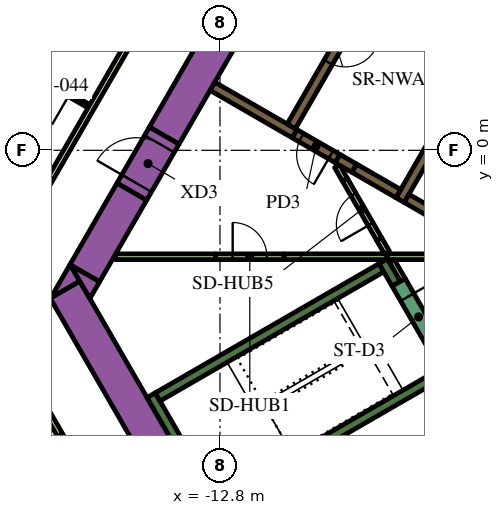
"""IFC4 building model, lengths in metres.
Left out: names, types, materials, properties, quantities, classifications, styles, units other than length and angle.
Written with IfcOpenShell. Run it as: python <this file> out.ifc"""

import sys

from ifc_helpers import new_model, si_unit, direction, frame, frame_2d, origin, place, context, subcontext, project, spatial, polyline, rectangle, outline, extrude, element, fill, save


model = new_model("IFC4")
c1 = context("Model", 3, precision=1e-05, world=origin(), true_north=direction((0.0, 1.0)))
c2 = subcontext(c1, "Body", "Model", "MODEL_VIEW")
j1 = project(units=[si_unit("LENGTHUNIT", "METRE"), si_unit("PLANEANGLEUNIT", "RADIAN")], contexts=[c1])
p1 = place(None, origin())
s1 = spatial("IfcSite", under=j1, at=p1, CompositionType="ELEMENT")
p2 = place(p1, origin())
s2 = spatial("IfcBuilding", under=s1, at=p2, CompositionType="ELEMENT")
p3 = place(p2, frame((0.0, 0.0, 58.8)))
s3 = spatial("IfcBuildingStorey", under=s2, at=p3, CompositionType="ELEMENT", Elevation=58.8)
p4 = place(p3, frame((-14.268, 0.387, 0.0), z_axis=(0.0, 0.0, 1.0), x_axis=(0.499994617707, 0.866028511231, 0.0)))
e1 = element("IfcWall", 1, at=p4, inside=s3, PredefinedType="SOLIDWALL", context=c2, shape_type="SweptSolid", body=[
    extrude(rectangle(XDim=18.817, YDim=0.9, at=frame_2d((9.409, 0.0))), origin(), (0.0, 0.0, 1.0), 3.9),
])
p5 = place(p3, frame((-12.134, -11.883, 0.0), z_axis=(0.0, 0.0, 1.0), x_axis=(-0.500005339912, 0.866022320763, 0.0)))
e2 = element("IfcWall", 2, at=p5, inside=s3, PredefinedType="SOLIDWALL", context=c2, shape_type="SweptSolid", body=[
    extrude(rectangle(XDim=9.488, YDim=0.9, at=frame_2d((4.744, 0.0))), origin(), (0.0, 0.0, 1.0), 3.9),
])
p6 = place(p3, origin())
e3 = element("IfcWall", 3, at=p6, inside=s3, PredefinedType="SOLIDWALL", context=c2, shape_type="SweptSolid", body=[
    extrude(outline(polyline([(-16.489, -3.44), (-17.251, -3.88), (-16.743, -3.0), (-16.489, -3.44)])), origin(), (0.0, 0.0, 1.0), 3.9),
])
p7 = place(p3, frame((-15.118, -1.085, 0.0), z_axis=(0.0, 0.0, 1.0), x_axis=(-0.50006606081, -0.865987260198, 0.0)))
e4 = element("IfcWall", 4, at=p7, inside=s3, PredefinedType="SOLIDWALL", context=c2, shape_type="SweptSolid", body=[
    extrude(rectangle(XDim=2.481, YDim=0.9, at=frame_2d((1.24, 0.0))), origin(), (0.0, 0.0, 1.0), 3.9),
])
e5 = element("IfcWall", 5, at=p6, inside=s3, PredefinedType="SOLIDWALL", context=c2, shape_type="SweptSolid", body=[
    extrude(outline(polyline([(-16.223, -3.9), (-16.732, -3.02), (-15.969, -3.46), (-16.223, -3.9)])), origin(), (0.0, 0.0, 1.0), 3.9),
])
p8 = place(p3, frame((-12.885, -9.431, 0.0), z_axis=(0.0, 0.0, 1.0), x_axis=(-0.500020560727, 0.866013532718, 0.0)))
e6 = element("IfcWall", 6, at=p8, inside=s3, PredefinedType="SOLIDWALL", context=c2, shape_type="SweptSolid", body=[
    extrude(rectangle(XDim=3.45, YDim=0.25, at=frame_2d((1.725, 0.0))), origin(), (0.0, 0.0, 1.0), 3.9),
])
p9 = place(p3, frame((-14.44, -6.49, 0.0), z_axis=(0.0, 0.0, 1.0), x_axis=(0.866022966069, 0.500004222222, 0.0)))
e7 = element("IfcWall", 7, at=p9, inside=s3, PredefinedType="SOLIDWALL", context=c2, shape_type="SweptSolid", body=[
    extrude(rectangle(XDim=6.8, YDim=0.25, at=frame_2d((3.4, 0.0))), origin(), (0.0, 0.0, 1.0), 3.9),
])
p10 = place(p3, frame((-8.163, -3.511, 0.0), z_axis=(0.0, 0.0, 1.0), x_axis=(-0.500206266495, 0.865906283012, 0.0)))
e8 = element("IfcWall", 8, at=p10, inside=s3, PredefinedType="SOLIDWALL", context=c2, shape_type="SweptSolid", body=[
    extrude(rectangle(XDim=0.684, YDim=0.25, at=frame_2d((0.342, 0.0))), origin(), (0.0, 0.0, 1.0), 3.9),
])
p11 = place(p3, frame((-12.84, -9.261, 0.0), z_axis=(0.0, 0.0, 1.0), x_axis=(0.866016039709, 0.500016218704, 0.0)))
e9 = element("IfcWall", 9, at=p11, inside=s3, PredefinedType="SOLIDWALL", context=c2, shape_type="SweptSolid", body=[
    extrude(rectangle(XDim=7.05, YDim=0.25, at=frame_2d((3.525, 0.0))), origin(), (0.0, 0.0, 1.0), 3.9),
])
p12 = place(p3, frame((-8.06, -1.311, 0.0), z_axis=(0.0, 0.0, 1.0), x_axis=(0.50000273126, 0.866023826885, 0.0)))
e10 = element("IfcWall", 10, at=p12, inside=s3, PredefinedType="SOLIDWALL", context=c2, shape_type="SweptSolid", body=[
    extrude(rectangle(XDim=10.33, YDim=0.25, at=frame_2d((5.165, 0.0))), origin(), (0.0, 0.0, 1.0), 3.9),
])
e11 = element("IfcWall", 11, at=p6, inside=s3, PredefinedType="SOLIDWALL", context=c2, shape_type="SweptSolid", body=[
    extrude(outline(polyline([(-5.922, -2.257), (-5.922, -2.257), (-5.705, -2.382), (-5.83, -2.598), (-6.418, -2.258), (-6.433, -2.153), (-6.433, -2.153), (-6.433, -2.153), (-6.508, -2.163), (-6.508, -2.163), (-6.508, -2.163), (-6.501, -2.21), (-7.952, -1.373), (-7.827, -1.156), (-5.922, -2.257)])), origin(), (0.0, 0.0, 1.0), 3.9),
])
p13 = place(p3, frame((-9.708, -0.215, 0.0), z_axis=(0.0, 0.0, 1.0), x_axis=(0.866113839764, -0.499846793097, 0.0)))
e12 = element("IfcWall", 12, at=p13, inside=s3, PredefinedType="SOLIDWALL", context=c2, shape_type="SweptSolid", body=[
    extrude(rectangle(XDim=0.51, YDim=0.25, at=frame_2d((0.255, 0.0))), origin(), (0.0, 0.0, 1.0), 3.9),
])
p14 = place(p3, frame((-12.999, 1.685, 0.0), z_axis=(0.0, 0.0, 1.0), x_axis=(0.865996765544, -0.500049599607, 0.0)))
e13 = element("IfcWall", 13, at=p14, inside=s3, PredefinedType="SOLIDWALL", context=c2, shape_type="SweptSolid", body=[
    extrude(rectangle(XDim=2.498, YDim=0.25, at=frame_2d((1.249, 0.0))), origin(), (0.0, 0.0, 1.0), 3.9),
])
p15 = place(p3, frame((-9.265, -0.471, 0.0), z_axis=(0.0, 0.0, 1.0), x_axis=(0.865954634268, -0.500122556369, 0.0)))
e14 = element("IfcWall", 14, at=p15, inside=s3, PredefinedType="SOLIDWALL", context=c2, shape_type="SweptSolid", body=[
    extrude(rectangle(XDim=1.338, YDim=0.25, at=frame_2d((0.669, 0.0))), origin(), (0.0, 0.0, 1.0), 3.9),
])
p16 = place(p3, frame((-12.915, -2.8, 0.0), z_axis=(0.0, 0.0, 1.0), x_axis=(-1.0, 0.0, 0.0)))
e15 = element("IfcWall", 15, at=p16, inside=s3, PredefinedType="PARTITIONING", context=c2, shape_type="SweptSolid", body=[
    extrude(rectangle(XDim=2.637, YDim=0.15, at=frame_2d((1.318, 0.0))), origin(), (0.0, 0.0, 1.0), 2.75),
])
p17 = place(p3, frame((-8.395, -2.8, 0.0), z_axis=(0.0, 0.0, 1.0), x_axis=(1.0, 0.0, 0.0)))
e16 = element("IfcWall", 16, at=p17, inside=s3, PredefinedType="PARTITIONING", context=c2, shape_type="SweptSolid", body=[
    extrude(rectangle(XDim=1.828, YDim=0.15, at=frame_2d((0.914, 0.0))), origin(), (0.0, 0.0, 1.0), 2.75),
])
p18 = place(p3, frame((-11.115, -2.8, 0.0), z_axis=(0.0, 0.0, 1.0), x_axis=(1.0, 0.0, 0.0)))
e17 = element("IfcWall", 17, at=p18, inside=s3, PredefinedType="PARTITIONING", context=c2, shape_type="SweptSolid", body=[
    extrude(rectangle(XDim=2.708, YDim=0.15, at=frame_2d((1.354, 0.0))), origin(), (0.0, 0.0, 1.0), 2.75),
])
p19 = place(p3, frame((-7.99, -3.412, 0.0), z_axis=(0.0, 0.0, 1.0), x_axis=(-0.500193841991, 0.86591346013, 0.0)))
e18 = element("IfcWall", 18, at=p19, inside=s3, PredefinedType="PARTITIONING", context=c2, shape_type="SweptSolid", body=[
    extrude(rectangle(XDim=0.583, YDim=0.15, at=frame_2d((0.292, 0.0))), origin(), (0.0, 0.0, 1.0), 2.75),
])
p20 = place(p3, frame((-8.612, -2.333, 0.0), z_axis=(0.0, 0.0, 1.0), x_axis=(0.500248216681, -0.86588204838, 0.0)))
e19 = element("IfcWall", 19, at=p20, inside=s3, PredefinedType="PARTITIONING", context=c2, shape_type="SweptSolid", body=[
    extrude(rectangle(XDim=0.415, YDim=0.15, at=frame_2d((0.208, 0.0))), origin(), (0.0, 0.0, 1.0), 2.75),
])
p21 = place(p3, frame((-9.512, -0.775, 0.0), z_axis=(0.0, 0.0, 1.0), x_axis=(-0.500080620599, 0.865978852456, 0.0)))
e20 = element("IfcWall", 20, at=p21, inside=s3, PredefinedType="PARTITIONING", context=c2, shape_type="SweptSolid", body=[
    extrude(rectangle(XDim=0.413, YDim=0.15, at=frame_2d((0.207, 0.0))), origin(), (0.0, 0.0, 1.0), 2.75),
])
p22 = place(p3, frame((-6.008, 9.144, 0.0), z_axis=(0.0, 0.0, 1.0), x_axis=(-0.500006956611, -0.866021387346, 0.0)))
e21 = element("IfcWall", 21, at=p22, inside=s3, PredefinedType="SOLIDWALL", context=c2, shape_type="SweptSolid", body=[
    extrude(rectangle(XDim=9.83, YDim=0.25, at=frame_2d((4.915, 0.0))), origin(), (0.0, 0.0, 1.0), 3.9),
])
p23 = place(p22, frame((6.985, 0.0, 0.0)))
e22 = element("IfcOpeningElement", 22, at=p23, cuts=e21, PredefinedType="OPENING", context=c2, shape_type="SweptSolid", body=[
    extrude(rectangle(XDim=0.9, YDim=2.1, at=frame_2d((0.45, 1.05))), frame((0.0, 0.135, 0.0), z_axis=(0.0, -1.0, 0.0), x_axis=(1.0, 0.0, 0.0)), (0.0, 0.0, 1.0), 0.27),
])
p24 = place(p3, frame((-8.098, -3.474, 0.0), z_axis=(0.0, 0.0, 1.0), x_axis=(0.49994051562, -0.866059744384, 0.0)))
e23 = element("IfcWall", 23, at=p24, inside=s3, PredefinedType="SOLIDWALL", context=c2, shape_type="SweptSolid", body=[
    extrude(rectangle(XDim=2.1, YDim=0.4, at=frame_2d((1.05, 0.0))), origin(), (0.0, 0.0, 1.0), 3.9),
])
p25 = place(p24, frame((0.45, 0.0, 0.0)))
e24 = element("IfcOpeningElement", 24, at=p25, cuts=e23, PredefinedType="OPENING", context=c2, shape_type="SweptSolid", body=[
    extrude(rectangle(XDim=1.2, YDim=2.1, at=frame_2d((0.6, 1.05))), frame((0.0, 0.21, 0.0), z_axis=(0.0, -1.0, 0.0), x_axis=(1.0, 0.0, 0.0)), (0.0, 0.0, 1.0), 0.42),
])
p26 = place(p3, frame((-9.708, -0.215, 0.0), z_axis=(0.0, 0.0, 1.0), x_axis=(-0.866004217611, 0.500036693733, 0.0)))
e25 = element("IfcWall", 25, at=p26, inside=s3, PredefinedType="SOLIDWALL", context=c2, shape_type="SweptSolid", body=[
    extrude(rectangle(XDim=1.3, YDim=0.25, at=frame_2d((0.65, 0.0))), origin(), (0.0, 0.0, 1.0), 3.9),
])
p27 = place(p26, frame((0.2, 0.0, 0.0)))
e26 = element("IfcOpeningElement", 26, at=p27, cuts=e25, PredefinedType="OPENING", context=c2, shape_type="SweptSolid", body=[
    extrude(rectangle(XDim=0.9, YDim=2.1, at=frame_2d((0.45, 1.05))), frame((0.0, 0.135, 0.0), z_axis=(0.0, -1.0, 0.0), x_axis=(1.0, 0.0, 0.0)), (0.0, 0.0, 1.0), 0.27),
])
p28 = place(p3, frame((-15.118, -1.085, 0.0), z_axis=(0.0, 0.0, 1.0), x_axis=(0.500000056704, 0.866025371046, 0.0)))
e27 = element("IfcWall", 27, at=p28, inside=s3, PredefinedType="SOLIDWALL", context=c2, shape_type="SweptSolid", body=[
    extrude(rectangle(XDim=1.7, YDim=0.9, at=frame_2d((0.85, 0.0))), origin(), (0.0, 0.0, 1.0), 3.9),
])
p29 = place(p28, frame((0.25, 0.0, 0.0)))
e28 = element("IfcOpeningElement", 28, at=p29, cuts=e27, PredefinedType="OPENING", context=c2, shape_type="SweptSolid", body=[
    extrude(rectangle(XDim=1.2, YDim=2.1, at=frame_2d((0.6, 1.05))), frame((0.0, 0.46, 0.0), z_axis=(0.0, -1.0, 0.0), x_axis=(1.0, 0.0, 0.0)), (0.0, 0.0, 1.0), 0.92),
])
p30 = place(p3, frame((-12.915, -2.8, 0.0), z_axis=(0.0, 0.0, 1.0), x_axis=(1.0, 0.0, 0.0)))
e29 = element("IfcWall", 29, at=p30, inside=s3, PredefinedType="PARTITIONING", context=c2, shape_type="SweptSolid", body=[
    extrude(rectangle(XDim=1.8, YDim=0.15, at=frame_2d((0.9, 0.0))), origin(), (0.0, 0.0, 1.0), 2.75),
])
p31 = place(p30, frame((0.45, 0.0, 0.0)))
e30 = element("IfcOpeningElement", 30, at=p31, cuts=e29, PredefinedType="OPENING", context=c2, shape_type="SweptSolid", body=[
    extrude(rectangle(XDim=0.9, YDim=2.1, at=frame_2d((0.45, 1.05))), frame((0.0, 0.085, 0.0), z_axis=(0.0, -1.0, 0.0), x_axis=(1.0, 0.0, 0.0)), (0.0, 0.0, 1.0), 0.17),
])
p32 = place(p3, frame((-8.612, -2.333, 0.0), z_axis=(0.0, 0.0, 1.0), x_axis=(-0.499961193289, 0.866047807691, 0.0)))
e31 = element("IfcWall", 31, at=p32, inside=s3, PredefinedType="PARTITIONING", context=c2, shape_type="SweptSolid", body=[
    extrude(rectangle(XDim=1.8, YDim=0.15, at=frame_2d((0.9, 0.0))), origin(), (0.0, 0.0, 1.0), 2.75),
])
p33 = place(p32, frame((0.45, 0.0, 0.0)))
e32 = element("IfcOpeningElement", 32, at=p33, cuts=e31, PredefinedType="OPENING", context=c2, shape_type="SweptSolid", body=[
    extrude(rectangle(XDim=0.9, YDim=2.1, at=frame_2d((0.45, 1.05))), frame((0.0, 0.085, 0.0), z_axis=(0.0, -1.0, 0.0), x_axis=(1.0, 0.0, 0.0)), (0.0, 0.0, 1.0), 0.17),
])
p34 = place(p3, frame((-19.081, -3.9, 0.0), z_axis=(0.0, 0.0, 1.0), x_axis=(0.499998313975, 0.866026377209, 0.0)))
e33 = element("IfcWall", 33, at=p34, inside=s3, PredefinedType="PARTITIONING", context=c2, shape_type="SweptSolid", body=[
    extrude(rectangle(XDim=25.766, YDim=0.15, at=frame_2d((12.883, 0.0))), origin(), (0.0, 0.0, 1.0), 2.75),
])
p35 = place(p34, frame((22.445, 0.0, 0.0)))
e34 = element("IfcOpeningElement", 34, at=p35, cuts=e33, PredefinedType="OPENING", context=c2, shape_type="SweptSolid", body=[
    extrude(rectangle(XDim=1.0, YDim=2.1, at=frame_2d((0.5, 1.05))), frame((0.0, 0.085, 0.0), z_axis=(0.0, -1.0, 0.0), x_axis=(1.0, 0.0, 0.0)), (0.0, 0.0, 1.0), 0.17),
])
p36 = place(p34, frame((21.138, 0.0, 0.0)))
e35 = element("IfcOpeningElement", 35, at=p36, cuts=e33, PredefinedType="OPENING", context=c2, shape_type="SweptSolid", body=[
    extrude(rectangle(XDim=1.0, YDim=2.1, at=frame_2d((0.5, 1.05))), frame((0.0, 0.085, 0.0), z_axis=(0.0, -1.0, 0.0), x_axis=(1.0, 0.0, 0.0)), (0.0, 0.0, 1.0), 0.17),
])
p37 = place(p34, frame((14.066, 0.0, 0.0)))
e36 = element("IfcOpeningElement", 36, at=p37, cuts=e33, PredefinedType="OPENING", context=c2, shape_type="SweptSolid", body=[
    extrude(rectangle(XDim=0.9, YDim=2.1, at=frame_2d((0.45, 1.05))), frame((0.0, 0.085, 0.0), z_axis=(0.0, -1.0, 0.0), x_axis=(1.0, 0.0, 0.0)), (0.0, 0.0, 1.0), 0.17),
])
p38 = place(p34, frame((11.693, 0.0, 0.0)))
e37 = element("IfcOpeningElement", 37, at=p38, cuts=e33, PredefinedType="OPENING", context=c2, shape_type="SweptSolid", body=[
    extrude(rectangle(XDim=1.0, YDim=2.1, at=frame_2d((0.5, 1.05))), frame((0.0, 0.085, 0.0), z_axis=(0.0, -1.0, 0.0), x_axis=(1.0, 0.0, 0.0)), (0.0, 0.0, 1.0), 0.17),
])
p39 = place(p3, frame((-16.412, -8.523, 0.0), z_axis=(0.0, 0.0, 1.0), x_axis=(-0.500001929737, 0.866024289647, 0.0)))
e38 = element("IfcWall", 38, at=p39, inside=s3, PredefinedType="PARTITIONING", context=c2, shape_type="SweptSolid", body=[
    extrude(rectangle(XDim=5.268, YDim=0.15, at=frame_2d((2.634, 0.0))), origin(), (0.0, 0.0, 1.0), 2.75),
])
p40 = place(p39, frame((0.226, 0.0, 0.0)))
e39 = element("IfcOpeningElement", 39, at=p40, cuts=e38, PredefinedType="OPENING", context=c2, shape_type="SweptSolid", body=[
    extrude(rectangle(XDim=1.0, YDim=2.1, at=frame_2d((0.5, 1.05))), frame((0.0, 0.085, 0.0), z_axis=(0.0, -1.0, 0.0), x_axis=(1.0, 0.0, 0.0)), (0.0, 0.0, 1.0), 0.17),
])
p41 = place(p3, frame((-16.247, 1.159, 0.0), z_axis=(0.0, 0.0, 1.0), x_axis=(-0.866059108428, 0.4999416173, 0.0)))
e40 = element("IfcWall", 40, at=p41, inside=s3, PredefinedType="PARTITIONING", context=c2, shape_type="SweptSolid", body=[
    extrude(rectangle(XDim=2.7, YDim=0.1, at=frame_2d((1.35, 0.0))), origin(), (0.0, 0.0, 1.0), 2.75),
])
p42 = place(p41, frame((0.6, 0.0, 0.0)))
e41 = element("IfcOpeningElement", 41, at=p42, cuts=e40, PredefinedType="OPENING", context=c2, shape_type="SweptSolid", body=[
    extrude(rectangle(XDim=0.9, YDim=2.1, at=frame_2d((0.45, 1.05))), frame((0.0, 0.06, 0.0), z_axis=(0.0, -1.0, 0.0), x_axis=(1.0, 0.0, 0.0)), (0.0, 0.0, 1.0), 0.12),
])
p43 = place(p23, origin())
e42 = element("IfcDoor", 42, at=p43, inside=s3, OperationType="SINGLE_SWING_LEFT", PredefinedType="DOOR", context=c2, shape_type="SweptSolid", body=[
    extrude(rectangle(XDim=0.9, YDim=2.1, at=frame_2d((0.45, 1.05))), frame((0.0, 0.025, 0.0), z_axis=(0.0, -1.0, 0.0), x_axis=(1.0, 0.0, 0.0)), (0.0, 0.0, 1.0), 0.05),
])
fill(e22, e42)
p44 = place(p25, origin())
e43 = element("IfcDoor", 43, at=p44, inside=s3, OperationType="SINGLE_SWING_LEFT", PredefinedType="DOOR", context=c2, shape_type="SweptSolid", body=[
    extrude(rectangle(XDim=1.2, YDim=2.1, at=frame_2d((0.6, 1.05))), frame((0.0, 0.025, 0.0), z_axis=(0.0, -1.0, 0.0), x_axis=(1.0, 0.0, 0.0)), (0.0, 0.0, 1.0), 0.05),
])
fill(e24, e43)
p45 = place(p27, origin())
e44 = element("IfcDoor", 44, at=p45, inside=s3, OperationType="SINGLE_SWING_LEFT", PredefinedType="DOOR", context=c2, shape_type="SweptSolid", body=[
    extrude(rectangle(XDim=0.9, YDim=2.1, at=frame_2d((0.45, 1.05))), frame((0.0, 0.025, 0.0), z_axis=(0.0, -1.0, 0.0), x_axis=(1.0, 0.0, 0.0)), (0.0, 0.0, 1.0), 0.05),
])
fill(e26, e44)
p46 = place(p29, origin())
e45 = element("IfcDoor", 45, at=p46, inside=s3, OperationType="SINGLE_SWING_LEFT", PredefinedType="DOOR", context=c2, shape_type="SweptSolid", body=[
    extrude(rectangle(XDim=1.2, YDim=2.1, at=frame_2d((0.6, 1.05))), frame((0.0, 0.025, 0.0), z_axis=(0.0, -1.0, 0.0), x_axis=(1.0, 0.0, 0.0)), (0.0, 0.0, 1.0), 0.05),
])
fill(e28, e45)
p47 = place(p31, origin())
e46 = element("IfcDoor", 46, at=p47, inside=s3, OperationType="SINGLE_SWING_LEFT", PredefinedType="DOOR", context=c2, shape_type="SweptSolid", body=[
    extrude(rectangle(XDim=0.9, YDim=2.1, at=frame_2d((0.45, 1.05))), frame((0.0, 0.025, 0.0), z_axis=(0.0, -1.0, 0.0), x_axis=(1.0, 0.0, 0.0)), (0.0, 0.0, 1.0), 0.05),
])
fill(e30, e46)
p48 = place(p33, origin())
e47 = element("IfcDoor", 47, at=p48, inside=s3, OperationType="SINGLE_SWING_LEFT", PredefinedType="DOOR", context=c2, shape_type="SweptSolid", body=[
    extrude(rectangle(XDim=0.9, YDim=2.1, at=frame_2d((0.45, 1.05))), frame((0.0, 0.025, 0.0), z_axis=(0.0, -1.0, 0.0), x_axis=(1.0, 0.0, 0.0)), (0.0, 0.0, 1.0), 0.05),
])
fill(e32, e47)
p49 = place(p42, origin())
e48 = element("IfcDoor", 48, at=p49, inside=s3, OperationType="SINGLE_SWING_LEFT", PredefinedType="DOOR", context=c2, shape_type="SweptSolid", body=[
    extrude(rectangle(XDim=0.9, YDim=2.1, at=frame_2d((0.45, 1.05))), frame((0.0, 0.025, 0.0), z_axis=(0.0, -1.0, 0.0), x_axis=(1.0, 0.0, 0.0)), (0.0, 0.0, 1.0), 0.05),
])
fill(e41, e48)
p50 = place(p40, origin())
e49 = element("IfcDoor", 49, at=p50, inside=s3, OperationType="SINGLE_SWING_LEFT", PredefinedType="DOOR", context=c2, shape_type="SweptSolid", body=[
    extrude(rectangle(XDim=1.0, YDim=2.1, at=frame_2d((0.5, 1.05))), frame((0.0, 0.025, 0.0), z_axis=(0.0, -1.0, 0.0), x_axis=(1.0, 0.0, 0.0)), (0.0, 0.0, 1.0), 0.05),
])
fill(e39, e49)
save(model, sys.argv[1])
